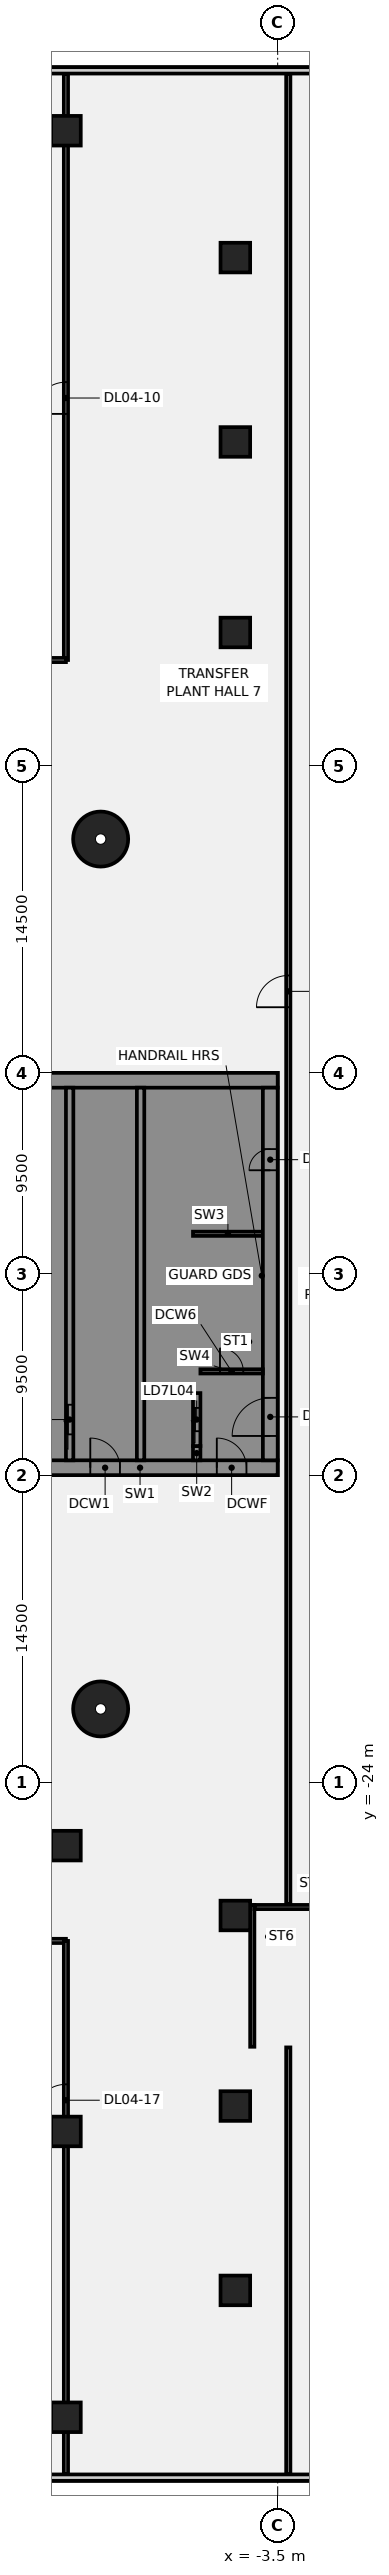
"""IFC4 building model, lengths in metres.
Left out: names, types, materials, properties, quantities, classifications, styles, units other than length and angle.
Written with IfcOpenShell. Run it as: python <this file> out.ifc"""

import sys

from ifc_helpers import new_model, si_unit, direction, frame, frame_2d, origin, origin_2d, place, context, subcontext, project, spatial, polyline, rectangle, circle, outline, extrude, element, fill, save


model = new_model("IFC4")
c1 = context("Model", 3, precision=1e-05, world=origin(), true_north=direction((0.0, 1.0)))
c2 = subcontext(c1, "Body", "Model", "MODEL_VIEW")
j1 = project(units=[si_unit("LENGTHUNIT", "METRE"), si_unit("PLANEANGLEUNIT", "RADIAN")], contexts=[c1])
p1 = place(None, origin())
s1 = spatial("IfcSite", under=j1, at=p1, CompositionType="ELEMENT")
p2 = place(p1, origin())
s2 = spatial("IfcBuilding", under=s1, at=p2, CompositionType="ELEMENT")
p3 = place(p2, frame((0.0, 0.0, 25.0)))
s3 = spatial("IfcBuildingStorey", under=s2, at=p3, CompositionType="ELEMENT", Elevation=25.0)
for number, where, z_axis, x_axis in (
    (1, (-11.86, 20.543, -0.45), (0.0, 0.0, 1.0), (1.0, 0.0, 0.0)),
    (2, (-11.86, -20.543, -0.45), (0.0, 0.0, 1.0), (1.0, 0.0, 0.0)),
):
    element("IfcColumn", number, at=place(p3, frame(where, z_axis=z_axis, x_axis=x_axis)), inside=s3, PredefinedType="COLUMN", context=c2, shape_type="SweptSolid", body=[
        extrude(circle(Radius=1.3, at=origin_2d()), origin(), (0.0, 0.0, 1.0), 4.35),
    ])
for number, where, z_axis, x_axis in (
    (3, (-5.5, 39.3, -0.45), (0.0, 0.0, 1.0), (1.0, 0.0, 0.0)),
    (4, (-5.5, 30.3, -0.45), (0.0, 0.0, 1.0), (1.0, 0.0, 0.0)),
    (5, (-5.5, 48.008, -0.45), (0.0, 0.0, 1.0), (1.0, 0.0, 0.0)),
    (6, (-5.5, -39.3, -0.45), (0.0, 0.0, 1.0), (1.0, 0.0, 0.0)),
    (7, (-5.5, -30.3, -0.45), (0.0, 0.0, 1.0), (1.0, 0.0, 0.0)),
    (8, (-5.5, -48.008, -0.45), (0.0, 0.0, 1.0), (1.0, 0.0, 0.0)),
    (9, (-13.5, -54.0, -0.45), (0.0, 0.0, 1.0), (1.0, 0.0, 0.0)),
    (10, (-13.5, -40.5, -0.45), (0.0, 0.0, 1.0), (1.0, 0.0, 0.0)),
    (11, (-13.5, -27.0, -0.45), (0.0, 0.0, 1.0), (1.0, 0.0, 0.0)),
    (12, (-13.5, 54.0, -0.45), (0.0, 0.0, 1.0), (1.0, 0.0, 0.0)),
):
    element("IfcColumn", number, at=place(p3, frame(where, z_axis=z_axis, x_axis=x_axis)), inside=s3, PredefinedType="COLUMN", context=c2, shape_type="SweptSolid", body=[
        extrude(rectangle(XDim=1.4, YDim=1.4, at=origin_2d()), origin(), (0.0, 0.0, 1.0), 4.35),
    ])
p4 = place(p3, frame((-23.62, -31.5, 0.0), z_axis=(0.0, 0.0, 1.0), x_axis=(1.0, 0.0, 0.0)))
e13 = element("IfcWall", 13, at=p4, inside=s3, PredefinedType="PARTITIONING", context=c2, shape_type="SweptSolid", body=[
    extrude(rectangle(XDim=10.12, YDim=0.2, at=frame_2d((5.06, 0.0))), origin(), (0.0, 0.0, 1.0), 3.9),
])
p5 = place(p3, frame((-13.5, -56.699, 0.0), z_axis=(0.0, 0.0, 1.0), x_axis=(0.0, 1.0, 0.0)))
e14 = element("IfcWall", 14, at=p5, inside=s3, PredefinedType="PARTITIONING", context=c2, shape_type="SweptSolid", body=[
    extrude(rectangle(XDim=25.199, YDim=0.2, at=frame_2d((12.6, 0.0))), origin(), (0.0, 0.0, 1.0), 3.9),
])
p6 = place(p5, frame((16.924, 0.0, 0.0)))
e15 = element("IfcOpeningElement", 15, at=p6, cuts=e14, PredefinedType="OPENING", context=c2, shape_type="SweptSolid", body=[
    extrude(rectangle(XDim=1.5, YDim=2.1, at=frame_2d((0.75, 1.05))), frame((0.0, 0.11, 0.0), z_axis=(0.0, -1.0, 0.0), x_axis=(1.0, 0.0, 0.0)), (0.0, 0.0, 1.0), 0.22),
])
p7 = place(p3, frame((-13.5, 29.0, 0.0), z_axis=(0.0, 0.0, 1.0), x_axis=(0.0, 1.0, 0.0)))
e16 = element("IfcWall", 16, at=p7, inside=s3, PredefinedType="PARTITIONING", context=c2, shape_type="SweptSolid", body=[
    extrude(rectangle(XDim=27.699, YDim=0.2, at=frame_2d((13.85, 0.0))), origin(), (0.0, 0.0, 1.0), 3.9),
])
p8 = place(p7, frame((11.625, 0.0, 0.0)))
e17 = element("IfcOpeningElement", 17, at=p8, cuts=e16, PredefinedType="OPENING", context=c2, shape_type="SweptSolid", body=[
    extrude(rectangle(XDim=1.5, YDim=2.1, at=frame_2d((0.75, 1.05))), frame((0.0, 0.11, 0.0), z_axis=(0.0, -1.0, 0.0), x_axis=(1.0, 0.0, 0.0)), (0.0, 0.0, 1.0), 0.22),
])
p9 = place(p3, frame((-16.42, 29.0, 0.0), z_axis=(0.0, 0.0, 1.0), x_axis=(1.0, 0.0, 0.0)))
e18 = element("IfcWall", 18, at=p9, inside=s3, PredefinedType="PARTITIONING", context=c2, shape_type="SweptSolid", body=[
    extrude(rectangle(XDim=2.92, YDim=0.2, at=frame_2d((1.46, 0.0))), origin(), (0.0, 0.0, 1.0), 3.9),
])
p10 = place(p3, frame((-3.0, -56.699, 0.0), z_axis=(0.0, 0.0, 1.0), x_axis=(0.0, 1.0, 0.0)))
e19 = element("IfcWall", 19, at=p10, inside=s3, PredefinedType="PARTITIONING", context=c2, shape_type="SweptSolid", body=[
    extrude(rectangle(XDim=20.169, YDim=0.2, at=frame_2d((10.084, 0.0))), origin(), (0.0, 0.0, 1.0), 3.9),
])
p11 = place(p3, frame((-3.0, -29.77, 0.0), z_axis=(0.0, 0.0, 1.0), x_axis=(0.0, 1.0, 0.0)))
e20 = element("IfcWall", 20, at=p11, inside=s3, PredefinedType="PARTITIONING", context=c2, shape_type="SweptSolid", body=[
    extrude(rectangle(XDim=86.469, YDim=0.2, at=frame_2d((43.234, 0.0))), origin(), (0.0, 0.0, 1.0), 3.9),
])
p12 = place(p11, frame((42.37, 0.0, 0.0)))
e21 = element("IfcOpeningElement", 21, at=p12, cuts=e20, PredefinedType="OPENING", context=c2, shape_type="SweptSolid", body=[
    extrude(rectangle(XDim=1.5, YDim=2.1, at=frame_2d((0.75, 1.05))), frame((0.0, 0.11, 0.0), z_axis=(0.0, -1.0, 0.0), x_axis=(1.0, 0.0, 0.0)), (0.0, 0.0, 1.0), 0.22),
])
p13 = place(p3, frame((55.988, 56.85, 0.0), z_axis=(0.0, 0.0, 1.0), x_axis=(-1.0, 0.0, 0.0)))
e22 = element("IfcWall", 22, at=p13, inside=s3, PredefinedType="SOLIDWALL", context=c2, shape_type="SweptSolid", body=[
    extrude(rectangle(XDim=111.977, YDim=0.3, at=frame_2d((55.988, 0.0))), origin(), (0.0, 0.0, 1.0), 3.9),
])
p14 = place(p13, frame((12.488, 0.0, 1.4)))
e23 = element("IfcOpeningElement", 23, at=p14, cuts=e22, PredefinedType="OPENING", context=c2, shape_type="SweptSolid", body=[
    extrude(rectangle(XDim=6.0, YDim=2.2, at=frame_2d((3.0, 1.1))), frame((0.0, 0.16, 0.0), z_axis=(0.0, -1.0, 0.0), x_axis=(1.0, 0.0, 0.0)), (0.0, 0.0, 1.0), 0.32),
])
p15 = place(p3, frame((-55.988, -56.85, 0.0), z_axis=(0.0, 0.0, 1.0), x_axis=(1.0, 0.0, 0.0)))
e24 = element("IfcWall", 24, at=p15, inside=s3, PredefinedType="SOLIDWALL", context=c2, shape_type="SweptSolid", body=[
    extrude(rectangle(XDim=111.977, YDim=0.3, at=frame_2d((55.988, 0.0))), origin(), (0.0, 0.0, 1.0), 3.9),
])
p16 = place(p15, frame((12.488, 0.0, 1.4)))
e25 = element("IfcOpeningElement", 25, at=p16, cuts=e24, PredefinedType="OPENING", context=c2, shape_type="SweptSolid", body=[
    extrude(rectangle(XDim=6.0, YDim=2.2, at=frame_2d((3.0, 1.1))), frame((0.0, 0.16, 0.0), z_axis=(0.0, -1.0, 0.0), x_axis=(1.0, 0.0, 0.0)), (0.0, 0.0, 1.0), 0.32),
])
p17 = place(p3, frame((-16.5, -9.15, 0.0), z_axis=(0.0, 0.0, 1.0), x_axis=(1.0, 0.0, 0.0)))
e26 = element("IfcWall", 26, at=p17, inside=s3, PredefinedType="SHEAR", context=c2, shape_type="SweptSolid", body=[
    extrude(rectangle(XDim=13.0, YDim=0.7, at=frame_2d((6.5, 0.0))), origin(), (0.0, 0.0, 1.0), 3.9),
])
p18 = place(p17, frame((4.15, 0.0, 0.0)))
e27 = element("IfcOpeningElement", 27, at=p18, cuts=e26, PredefinedType="OPENING", context=c2, shape_type="SweptSolid", body=[
    extrude(rectangle(XDim=1.4, YDim=2.1, at=frame_2d((0.7, 1.05))), frame((0.0, 0.36, 0.0), z_axis=(0.0, -1.0, 0.0), x_axis=(1.0, 0.0, 0.0)), (0.0, 0.0, 1.0), 0.72),
])
p19 = place(p17, frame((10.125, 0.0, 0.0)))
e28 = element("IfcOpeningElement", 28, at=p19, cuts=e26, PredefinedType="OPENING", context=c2, shape_type="SweptSolid", body=[
    extrude(rectangle(XDim=1.4, YDim=2.1, at=frame_2d((0.7, 1.05))), frame((0.0, 0.36, 0.0), z_axis=(0.0, -1.0, 0.0), x_axis=(1.0, 0.0, 0.0)), (0.0, 0.0, 1.0), 0.72),
])
p20 = place(p3, origin())
e29 = element("IfcWall", 29, at=p20, inside=s3, PredefinedType="SHEAR", context=c2, shape_type="SweptSolid", body=[
    extrude(outline(polyline([(-13.5, -8.8), (-13.5, -8.125), (-15.8, -8.125), (-15.8, -5.625), (-13.5, -5.625), (-13.5, -5.375), (-15.8, -5.375), (-15.8, -2.875), (-13.5, -2.875), (-13.5, -2.625), (-15.8, -2.625), (-15.8, -0.125), (-13.5, -0.125), (-13.5, 0.125), (-15.8, 0.125), (-15.8, 2.625), (-13.5, 2.625), (-13.5, 2.875), (-15.8, 2.875), (-15.8, 5.375), (-13.5, 5.375), (-13.5, 5.625), (-15.8, 5.625), (-15.8, 8.125), (-13.5, 8.125), (-13.5, 8.8), (-15.8, 8.8), (-16.5, 8.8), (-16.5, -8.8), (-15.8, -8.8), (-13.5, -8.8)])), origin(), (0.0, 0.0, 1.0), 3.9),
])
p21 = place(p3, frame((-16.5, 9.15, 0.0), z_axis=(0.0, 0.0, 1.0), x_axis=(1.0, 0.0, 0.0)))
e30 = element("IfcWall", 30, at=p21, inside=s3, PredefinedType="SHEAR", context=c2, shape_type="SweptSolid", body=[
    extrude(rectangle(XDim=13.0, YDim=0.7, at=frame_2d((6.5, 0.0))), origin(), (0.0, 0.0, 1.0), 3.9),
])
p22 = place(p3, origin())
e31 = element("IfcWall", 31, at=p22, inside=s3, PredefinedType="SHEAR", context=c2, shape_type="SweptSolid", body=[
    extrude(outline(polyline([(-9.8, -5.375), (-9.8, -5.625), (-7.5, -5.625), (-7.15, -5.625), (-7.15, 8.8), (-7.5, 8.8), (-9.8, 8.8), (-9.8, 8.125), (-7.5, 8.125), (-7.5, 5.625), (-9.8, 5.625), (-9.8, 5.375), (-7.5, 5.375), (-7.5, 2.875), (-9.8, 2.875), (-9.8, 2.625), (-7.5, 2.625), (-7.5, 0.125), (-9.8, 0.125), (-9.8, -0.125), (-7.5, -0.125), (-7.5, -2.625), (-9.8, -2.625), (-9.8, -2.875), (-7.5, -2.875), (-7.5, -5.375), (-9.8, -5.375)])), origin(), (0.0, 0.0, 1.0), 3.9),
])
p23 = place(p3, origin())
e32 = element("IfcWall", 32, at=p23, inside=s3, PredefinedType="SHEAR", context=c2, shape_type="SweptSolid", body=[
    extrude(outline(polyline([(-7.5, -8.125), (-9.55, -8.125), (-9.55, -5.625), (-9.8, -5.625), (-9.8, -8.125), (-9.8, -8.8), (-7.5, -8.8), (-7.5, -8.125)])), origin(), (0.0, 0.0, 1.0), 3.9),
])
p24 = place(p3, frame((-7.325, -8.8, 0.0), z_axis=(0.0, 0.0, 1.0), x_axis=(0.0, 1.0, 0.0)))
e33 = element("IfcWall", 33, at=p24, inside=s3, PredefinedType="SHEAR", context=c2, shape_type="SweptSolid", body=[
    extrude(rectangle(XDim=0.675, YDim=0.35, at=frame_2d((0.337, 0.0))), origin(), (0.0, 0.0, 1.0), 3.9),
])
p25 = place(p3, frame((-7.5, 1.9, 0.0), z_axis=(0.0, 0.0, 1.0), x_axis=(1.0, 0.0, 0.0)))
e34 = element("IfcWall", 34, at=p25, inside=s3, PredefinedType="SHEAR", context=c2, shape_type="SweptSolid", body=[
    extrude(rectangle(XDim=3.3, YDim=0.2, at=frame_2d((1.65, 0.0))), origin(), (0.0, 0.0, 1.0), 3.9),
])
p26 = place(p3, frame((-13.325, -8.8, 0.0), z_axis=(0.0, 0.0, 1.0), x_axis=(0.0, 1.0, 0.0)))
e35 = element("IfcWall", 35, at=p26, inside=s3, PredefinedType="SHEAR", context=c2, shape_type="SweptSolid", body=[
    extrude(rectangle(XDim=17.6, YDim=0.35, at=frame_2d((8.8, 0.0))), origin(), (0.0, 0.0, 1.0), 3.9),
])
p27 = place(p26, frame((1.225, 0.0, 0.0)))
e36 = element("IfcOpeningElement", 36, at=p27, cuts=e35, PredefinedType="OPENING", context=c2, shape_type="SweptSolid", body=[
    extrude(rectangle(XDim=1.4, YDim=2.1, at=frame_2d((0.7, 1.05))), frame((0.0, 0.185, 0.0), z_axis=(0.0, -1.0, 0.0), x_axis=(1.0, 0.0, 0.0)), (0.0, 0.0, 1.0), 0.37),
])
p28 = place(p3, frame((-9.975, -8.8, 0.0), z_axis=(0.0, 0.0, 1.0), x_axis=(0.0, 1.0, 0.0)))
e37 = element("IfcWall", 37, at=p28, inside=s3, PredefinedType="SHEAR", context=c2, shape_type="SweptSolid", body=[
    extrude(rectangle(XDim=17.6, YDim=0.35, at=frame_2d((8.8, 0.0))), origin(), (0.0, 0.0, 1.0), 3.9),
])
p29 = place(p3, frame((-7.325, -8.125, 0.0), z_axis=(0.0, 0.0, 1.0), x_axis=(0.0, 1.0, 0.0)))
e38 = element("IfcWall", 38, at=p29, inside=s3, PredefinedType="SHEAR", context=c2, shape_type="SweptSolid", body=[
    extrude(rectangle(XDim=2.5, YDim=0.35, at=frame_2d((1.25, 0.0))), origin(), (0.0, 0.0, 1.0), 3.9),
])
p30 = place(p29, frame((0.7, 0.0, 0.0)))
e39 = element("IfcOpeningElement", 39, at=p30, cuts=e38, PredefinedType="OPENING", context=c2, shape_type="SweptSolid", body=[
    extrude(rectangle(XDim=1.1, YDim=2.1, at=frame_2d((0.55, 1.05))), frame((0.0, 0.185, 0.0), z_axis=(0.0, -1.0, 0.0), x_axis=(1.0, 0.0, 0.0)), (0.0, 0.0, 1.0), 0.37),
])
p31 = place(p3, frame((-3.85, -8.8, 0.0), z_axis=(0.0, 0.0, 1.0), x_axis=(0.0, 1.0, 0.0)))
e40 = element("IfcWall", 40, at=p31, inside=s3, PredefinedType="SHEAR", context=c2, shape_type="SweptSolid", body=[
    extrude(rectangle(XDim=17.6, YDim=0.7, at=frame_2d((8.8, 0.0))), origin(), (0.0, 0.0, 1.0), 3.9),
])
p32 = place(p31, frame((1.15, 0.0, 0.0)))
e41 = element("IfcOpeningElement", 41, at=p32, cuts=e40, PredefinedType="OPENING", context=c2, shape_type="SweptSolid", body=[
    extrude(rectangle(XDim=1.8, YDim=2.1, at=frame_2d((0.9, 1.05))), frame((0.0, 0.36, 0.0), z_axis=(0.0, -1.0, 0.0), x_axis=(1.0, 0.0, 0.0)), (0.0, 0.0, 1.0), 0.72),
])
p33 = place(p31, frame((13.7, 0.0, 0.0)))
e42 = element("IfcOpeningElement", 42, at=p33, cuts=e40, PredefinedType="OPENING", context=c2, shape_type="SweptSolid", body=[
    extrude(rectangle(XDim=1.0, YDim=2.1, at=frame_2d((0.5, 1.05))), frame((0.0, 0.36, 0.0), z_axis=(0.0, -1.0, 0.0), x_axis=(1.0, 0.0, 0.0)), (0.0, 0.0, 1.0), 0.72),
])
p34 = place(p3, frame((-7.15, -4.6, 0.0), z_axis=(0.0, 0.0, 1.0), x_axis=(1.0, 0.0, 0.0)))
e43 = element("IfcWall", 43, at=p34, inside=s3, PredefinedType="SHEAR", context=c2, shape_type="SweptSolid", body=[
    extrude(rectangle(XDim=2.95, YDim=0.2, at=frame_2d((1.475, 0.0))), origin(), (0.0, 0.0, 1.0), 3.9),
])
p35 = place(p34, frame((0.925, 0.0, 0.0)))
e44 = element("IfcOpeningElement", 44, at=p35, cuts=e43, PredefinedType="OPENING", context=c2, shape_type="SweptSolid", body=[
    extrude(rectangle(XDim=1.1, YDim=2.1, at=frame_2d((0.55, 1.05))), frame((0.0, 0.11, 0.0), z_axis=(0.0, -1.0, 0.0), x_axis=(1.0, 0.0, 0.0)), (0.0, 0.0, 1.0), 0.22),
])
p36 = place(p3, frame((-4.7, -29.8, 0.0), z_axis=(0.0, 0.0, 1.0), x_axis=(0.0, -1.0, 0.0)))
e45 = element("IfcWall", 45, at=p36, inside=s3, PredefinedType="SHEAR", context=c2, shape_type="SweptSolid", body=[
    extrude(rectangle(XDim=6.7, YDim=0.2, at=frame_2d((3.35, 0.0))), origin(), (0.0, 0.0, 1.0), 3.9),
])
p37 = place(p3, frame((-4.6, -29.9, 0.0), z_axis=(0.0, 0.0, 1.0), x_axis=(1.0, 0.0, 0.0)))
e46 = element("IfcWall", 46, at=p37, inside=s3, PredefinedType="SHEAR", context=c2, shape_type="SweptSolid", body=[
    extrude(rectangle(XDim=3.2, YDim=0.2, at=frame_2d((1.6, 0.0))), origin(), (0.0, 0.0, 1.0), 3.9),
])
p38 = place(p3, origin())
e47 = element("IfcWall", 47, at=p38, inside=s3, PredefinedType="SHEAR", context=c2, shape_type="SweptSolid", body=[
    extrude(outline(polyline([(-4.6, -36.3), (-4.6, -36.5), (-1.4, -36.5), (-1.4, -36.3), (-4.6, -36.3)])), origin(), (0.0, 0.0, 1.0), 3.9),
])
p39 = place(p8, origin())
e48 = element("IfcDoor", 48, at=p39, inside=s3, OperationType="SINGLE_SWING_RIGHT", PredefinedType="DOOR", context=c2, shape_type="SweptSolid", body=[
    extrude(rectangle(XDim=1.5, YDim=2.1, at=frame_2d((0.75, 1.05))), frame((0.0, 0.025, 0.0), z_axis=(0.0, -1.0, 0.0), x_axis=(1.0, 0.0, 0.0)), (0.0, 0.0, 1.0), 0.05),
])
fill(e17, e48)
p40 = place(p6, origin())
e49 = element("IfcDoor", 49, at=p40, inside=s3, OperationType="SINGLE_SWING_LEFT", PredefinedType="DOOR", context=c2, shape_type="SweptSolid", body=[
    extrude(rectangle(XDim=1.5, YDim=2.1, at=frame_2d((0.75, 1.05))), frame((0.0, 0.025, 0.0), z_axis=(0.0, -1.0, 0.0), x_axis=(1.0, 0.0, 0.0)), (0.0, 0.0, 1.0), 0.05),
])
fill(e15, e49)
p41 = place(p12, origin())
e50 = element("IfcDoor", 50, at=p41, inside=s3, OperationType="SINGLE_SWING_RIGHT", PredefinedType="DOOR", context=c2, shape_type="SweptSolid", body=[
    extrude(rectangle(XDim=1.5, YDim=2.1, at=frame_2d((0.75, 1.05))), frame((0.0, 0.025, 0.0), z_axis=(0.0, -1.0, 0.0), x_axis=(1.0, 0.0, 0.0)), (0.0, 0.0, 1.0), 0.05),
])
fill(e21, e50)
p42 = place(p18, origin())
e51 = element("IfcDoor", 51, at=p42, inside=s3, OperationType="SINGLE_SWING_LEFT", PredefinedType="DOOR", context=c2, shape_type="SweptSolid", body=[
    extrude(rectangle(XDim=1.4, YDim=2.1, at=frame_2d((0.7, 1.05))), frame((0.0, 0.025, 0.0), z_axis=(0.0, -1.0, 0.0), x_axis=(1.0, 0.0, 0.0)), (0.0, 0.0, 1.0), 0.05),
])
fill(e27, e51)
p43 = place(p19, origin())
e52 = element("IfcDoor", 52, at=p43, inside=s3, OperationType="SINGLE_SWING_LEFT", PredefinedType="DOOR", context=c2, shape_type="SweptSolid", body=[
    extrude(rectangle(XDim=1.4, YDim=2.1, at=frame_2d((0.7, 1.05))), frame((0.0, 0.025, 0.0), z_axis=(0.0, -1.0, 0.0), x_axis=(1.0, 0.0, 0.0)), (0.0, 0.0, 1.0), 0.05),
])
fill(e28, e52)
p44 = place(p32, origin())
e53 = element("IfcDoor", 53, at=p44, inside=s3, OperationType="SINGLE_SWING_LEFT", PredefinedType="DOOR", context=c2, shape_type="SweptSolid", body=[
    extrude(rectangle(XDim=1.8, YDim=2.1, at=frame_2d((0.9, 1.05))), frame((0.0, 0.025, 0.0), z_axis=(0.0, -1.0, 0.0), x_axis=(1.0, 0.0, 0.0)), (0.0, 0.0, 1.0), 0.05),
])
fill(e41, e53)
p45 = place(p33, origin())
e54 = element("IfcDoor", 54, at=p45, inside=s3, OperationType="SINGLE_SWING_LEFT", PredefinedType="DOOR", context=c2, shape_type="SweptSolid", body=[
    extrude(rectangle(XDim=1.0, YDim=2.1, at=frame_2d((0.5, 1.05))), frame((0.0, 0.025, 0.0), z_axis=(0.0, -1.0, 0.0), x_axis=(1.0, 0.0, 0.0)), (0.0, 0.0, 1.0), 0.05),
])
fill(e42, e54)
p46 = place(p35, origin())
e55 = element("IfcDoor", 55, at=p46, inside=s3, OperationType="SINGLE_SWING_LEFT", PredefinedType="DOOR", context=c2, shape_type="SweptSolid", body=[
    extrude(rectangle(XDim=1.1, YDim=2.1, at=frame_2d((0.55, 1.05))), frame((0.0, 0.025, 0.0), z_axis=(0.0, -1.0, 0.0), x_axis=(1.0, 0.0, 0.0)), (0.0, 0.0, 1.0), 0.05),
])
fill(e44, e55)
p47 = place(p27, origin())
e56 = element("IfcDoor", 56, at=p47, inside=s3, OperationType="SLIDING_TO_LEFT", PredefinedType="DOOR", context=c2, shape_type="SweptSolid", body=[
    extrude(rectangle(XDim=1.4, YDim=2.1, at=frame_2d((0.7, 1.05))), frame((0.0, 0.025, 0.0), z_axis=(0.0, -1.0, 0.0), x_axis=(1.0, 0.0, 0.0)), (0.0, 0.0, 1.0), 0.05),
])
fill(e36, e56)
p48 = place(p30, origin())
e57 = element("IfcDoor", 57, at=p48, inside=s3, OperationType="SLIDING_TO_LEFT", PredefinedType="DOOR", context=c2, shape_type="SweptSolid", body=[
    extrude(rectangle(XDim=1.1, YDim=2.1, at=frame_2d((0.55, 1.05))), frame((0.0, 0.025, 0.0), z_axis=(0.0, -1.0, 0.0), x_axis=(1.0, 0.0, 0.0)), (0.0, 0.0, 1.0), 0.05),
])
fill(e39, e57)
save(model, sys.argv[1])
